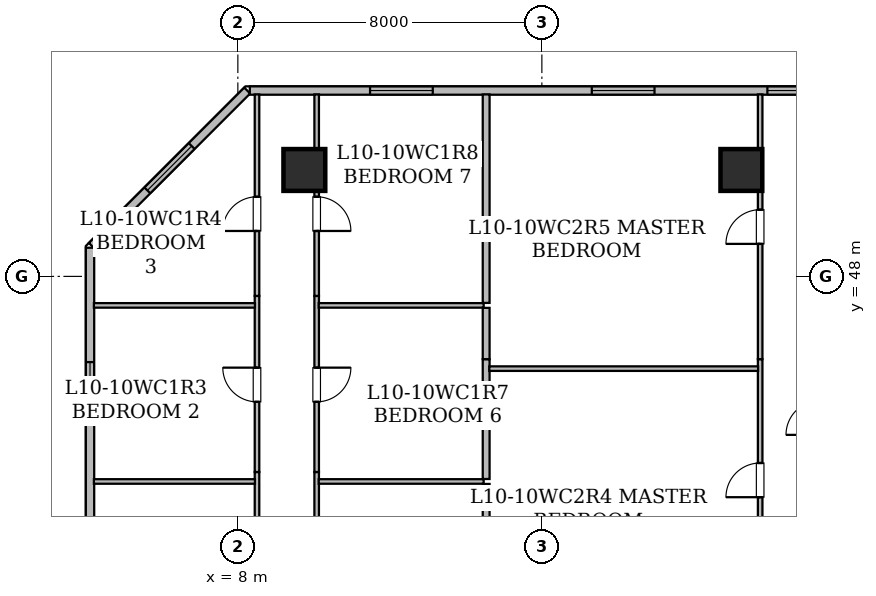
"""IFC4 building model, lengths in metres.
Left out: names, types, materials, properties, quantities, classifications, styles, units other than length and angle.
Written with IfcOpenShell. Run it as: python <this file> out.ifc"""

import sys

from ifc_helpers import new_model, si_unit, direction, frame, frame_2d, origin, origin_2d, place, context, subcontext, project, spatial, rectangle, hollow_rectangle, extrude, element, fill, save


model = new_model("IFC4")
c1 = context("Model", 3, precision=1e-05, world=origin(), true_north=direction((0.0, 1.0)))
c2 = subcontext(c1, "Body", "Model", "MODEL_VIEW")
j1 = project(units=[si_unit("LENGTHUNIT", "METRE"), si_unit("PLANEANGLEUNIT", "RADIAN")], contexts=[c1])
p1 = place(None, origin())
s1 = spatial("IfcSite", under=j1, at=p1, CompositionType="ELEMENT")
p2 = place(p1, origin())
s2 = spatial("IfcBuilding", under=s1, at=p2, CompositionType="ELEMENT")
p3 = place(p2, frame((0.0, 0.0, 44.25)))
s3 = spatial("IfcBuildingStorey", under=s2, at=p3, CompositionType="ELEMENT", Elevation=44.25)
for number, where, z_axis, x_axis in (
    (1, (9.75, 50.8, 0.0), (0.0, 0.0, 1.0), (1.0, 0.0, 0.0)),
    (2, (21.25, 50.8, 0.0), (0.0, 0.0, 1.0), (1.0, 0.0, 0.0)),
):
    element("IfcColumn", number, at=place(p3, frame(where, z_axis=z_axis, x_axis=x_axis)), inside=s3, PredefinedType="COLUMN", context=c2, shape_type="SweptSolid", body=[
        extrude(hollow_rectangle(XDim=1.1, YDim=1.1, WallThickness=0.055, at=origin_2d()), origin(), (0.0, 0.0, 1.0), 3.65),
    ])
p4 = place(p3, frame((4.11, 31.295, 0.0), z_axis=(0.0, 0.0, 1.0), x_axis=(0.0, 1.0, 0.0)))
e3 = element("IfcWall", 3, at=p4, inside=s3, PredefinedType="STANDARD", context=c2, shape_type="SweptSolid", body=[
    extrude(rectangle(XDim=17.459, YDim=0.22, at=frame_2d((8.729, 0.0))), origin(), (0.0, 0.0, 1.0), 3.43),
])
p5 = place(p4, frame((1.376, 0.0, 0.85)))
e4 = element("IfcOpeningElement", 4, at=p5, cuts=e3, PredefinedType="OPENING", context=c2, shape_type="SweptSolid", body=[
    extrude(rectangle(XDim=1.65, YDim=1.55, at=frame_2d((0.825, 0.775))), frame((0.0, 0.12, 0.0), z_axis=(0.0, -1.0, 0.0), x_axis=(1.0, 0.0, 0.0)), (0.0, 0.0, 1.0), 0.24),
])
p6 = place(p4, frame((6.638, 0.0, 0.85)))
e5 = element("IfcOpeningElement", 5, at=p6, cuts=e3, PredefinedType="OPENING", context=c2, shape_type="SweptSolid", body=[
    extrude(rectangle(XDim=1.65, YDim=1.55, at=frame_2d((0.825, 0.775))), frame((0.0, 0.12, 0.0), z_axis=(0.0, -1.0, 0.0), x_axis=(1.0, 0.0, 0.0)), (0.0, 0.0, 1.0), 0.24),
])
p7 = place(p4, frame((12.8, 0.0, 0.85)))
e6 = element("IfcOpeningElement", 6, at=p7, cuts=e3, PredefinedType="OPENING", context=c2, shape_type="SweptSolid", body=[
    extrude(rectangle(XDim=1.65, YDim=1.55, at=frame_2d((0.825, 0.775))), frame((0.0, 0.12, 0.0), z_axis=(0.0, -1.0, 0.0), x_axis=(1.0, 0.0, 0.0)), (0.0, 0.0, 1.0), 0.24),
])
p8 = place(p3, frame((4.158, 48.802, 0.0), z_axis=(0.0, 0.0, 1.0), x_axis=(0.70712789547, 0.707085666273, 0.0)))
e7 = element("IfcWall", 7, at=p8, inside=s3, PredefinedType="STANDARD", context=c2, shape_type="SweptSolid", body=[
    extrude(rectangle(XDim=5.781, YDim=0.22, at=frame_2d((2.891, 0.0))), origin(), (0.0, 0.0, 1.0), 3.43),
])
p9 = place(p8, frame((2.066, 0.0, 0.85)))
e8 = element("IfcOpeningElement", 8, at=p9, cuts=e7, PredefinedType="OPENING", context=c2, shape_type="SweptSolid", body=[
    extrude(rectangle(XDim=1.65, YDim=1.55, at=frame_2d((0.825, 0.775))), frame((0.0, 0.12, 0.0), z_axis=(0.0, -1.0, 0.0), x_axis=(1.0, 0.0, 0.0)), (0.0, 0.0, 1.0), 0.24),
])
p10 = place(p3, frame((8.315, 52.89, 0.0), z_axis=(0.0, 0.0, 1.0), x_axis=(1.0, 0.0, 0.0)))
e9 = element("IfcWall", 9, at=p10, inside=s3, PredefinedType="STANDARD", context=c2, shape_type="SweptSolid", body=[
    extrude(rectangle(XDim=37.439, YDim=0.22, at=frame_2d((18.719, 0.0))), origin(), (0.0, 0.0, 1.0), 3.43),
])
p11 = place(p10, frame((3.164, 0.0, 0.85)))
e10 = element("IfcOpeningElement", 10, at=p11, cuts=e9, PredefinedType="OPENING", context=c2, shape_type="SweptSolid", body=[
    extrude(rectangle(XDim=1.65, YDim=1.55, at=frame_2d((0.825, 0.775))), frame((0.0, 0.12, 0.0), z_axis=(0.0, -1.0, 0.0), x_axis=(1.0, 0.0, 0.0)), (0.0, 0.0, 1.0), 0.24),
])
p12 = place(p10, frame((15.94, 0.0, 0.85)))
e11 = element("IfcOpeningElement", 11, at=p12, cuts=e9, PredefinedType="OPENING", context=c2, shape_type="SweptSolid", body=[
    extrude(rectangle(XDim=1.65, YDim=1.55, at=frame_2d((0.825, 0.775))), frame((0.0, 0.12, 0.0), z_axis=(0.0, -1.0, 0.0), x_axis=(1.0, 0.0, 0.0)), (0.0, 0.0, 1.0), 0.24),
])
p13 = place(p10, frame((13.619, 0.0, 0.8)))
e12 = element("IfcOpeningElement", 12, at=p13, cuts=e9, PredefinedType="OPENING", context=c2, shape_type="SweptSolid", body=[
    extrude(rectangle(XDim=1.2, YDim=1.5, at=frame_2d((0.6, 0.75))), frame((0.0, 0.12, 0.0), z_axis=(0.0, -1.0, 0.0), x_axis=(1.0, 0.0, 0.0)), (0.0, 0.0, 1.0), 0.24),
])
p14 = place(p10, frame((8.999, 0.0, 0.85)))
e13 = element("IfcOpeningElement", 13, at=p14, cuts=e9, PredefinedType="OPENING", context=c2, shape_type="SweptSolid", body=[
    extrude(rectangle(XDim=1.65, YDim=1.55, at=frame_2d((0.825, 0.775))), frame((0.0, 0.12, 0.0), z_axis=(0.0, -1.0, 0.0), x_axis=(1.0, 0.0, 0.0)), (0.0, 0.0, 1.0), 0.24),
])
p15 = place(p10, frame((25.185, 0.0, 0.8)))
e14 = element("IfcOpeningElement", 14, at=p15, cuts=e9, PredefinedType="OPENING", context=c2, shape_type="SweptSolid", body=[
    extrude(rectangle(XDim=1.2, YDim=1.5, at=frame_2d((0.6, 0.75))), frame((0.0, 0.12, 0.0), z_axis=(0.0, -1.0, 0.0), x_axis=(1.0, 0.0, 0.0)), (0.0, 0.0, 1.0), 0.24),
])
p16 = place(p10, frame((20.935, 0.0, 0.85)))
e15 = element("IfcOpeningElement", 15, at=p16, cuts=e9, PredefinedType="OPENING", context=c2, shape_type="SweptSolid", body=[
    extrude(rectangle(XDim=1.65, YDim=1.55, at=frame_2d((0.825, 0.775))), frame((0.0, 0.12, 0.0), z_axis=(0.0, -1.0, 0.0), x_axis=(1.0, 0.0, 0.0)), (0.0, 0.0, 1.0), 0.24),
])
p17 = place(p10, frame((28.985, 0.0, 0.85)))
e16 = element("IfcOpeningElement", 16, at=p17, cuts=e9, PredefinedType="OPENING", context=c2, shape_type="SweptSolid", body=[
    extrude(rectangle(XDim=1.65, YDim=1.55, at=frame_2d((0.825, 0.775))), frame((0.0, 0.12, 0.0), z_axis=(0.0, -1.0, 0.0), x_axis=(1.0, 0.0, 0.0)), (0.0, 0.0, 1.0), 0.24),
])
p18 = place(p10, frame((33.98, 0.0, 0.85)))
e17 = element("IfcOpeningElement", 17, at=p18, cuts=e9, PredefinedType="OPENING", context=c2, shape_type="SweptSolid", body=[
    extrude(rectangle(XDim=1.65, YDim=1.55, at=frame_2d((0.825, 0.775))), frame((0.0, 0.12, 0.0), z_axis=(0.0, -1.0, 0.0), x_axis=(1.0, 0.0, 0.0)), (0.0, 0.0, 1.0), 0.24),
])
p19 = place(p3, frame((8.504, 35.161, 0.0), z_axis=(0.0, 0.0, 1.0), x_axis=(0.0, 1.0, 0.0)))
e18 = element("IfcWall", 18, at=p19, inside=s3, PredefinedType="PARTITIONING", context=c2, shape_type="SweptSolid", body=[
    extrude(rectangle(XDim=7.692, YDim=0.12, at=frame_2d((3.846, 0.0))), origin(), (0.0, 0.0, 1.0), 2.647),
])
p20 = place(p19, frame((3.375, 0.0, 0.0)))
e19 = element("IfcOpeningElement", 19, at=p20, cuts=e18, PredefinedType="OPENING", context=c2, shape_type="SweptSolid", body=[
    extrude(rectangle(XDim=0.9, YDim=2.1, at=frame_2d((0.45, 1.05))), frame((0.0, 0.07, 0.0), z_axis=(0.0, -1.0, 0.0), x_axis=(1.0, 0.0, 0.0)), (0.0, 0.0, 1.0), 0.14),
])
p21 = place(p3, frame((8.504, 42.853, 0.0), z_axis=(0.0, 0.0, 1.0), x_axis=(0.0, 1.0, 0.0)))
e20 = element("IfcWall", 20, at=p21, inside=s3, PredefinedType="PARTITIONING", context=c2, shape_type="SweptSolid", body=[
    extrude(rectangle(XDim=4.633, YDim=0.12, at=frame_2d((2.316, 0.0))), origin(), (0.0, 0.0, 1.0), 2.803),
])
p22 = place(p21, frame((1.846, 0.0, 0.0)))
e21 = element("IfcOpeningElement", 21, at=p22, cuts=e20, PredefinedType="OPENING", context=c2, shape_type="SweptSolid", body=[
    extrude(rectangle(XDim=0.9, YDim=2.1, at=frame_2d((0.45, 1.05))), frame((0.0, 0.07, 0.0), z_axis=(0.0, -1.0, 0.0), x_axis=(1.0, 0.0, 0.0)), (0.0, 0.0, 1.0), 0.14),
])
p23 = place(p3, frame((8.504, 47.486, 0.0), z_axis=(0.0, 0.0, 1.0), x_axis=(0.0, 1.0, 0.0)))
e22 = element("IfcWall", 22, at=p23, inside=s3, PredefinedType="PARTITIONING", context=c2, shape_type="SweptSolid", body=[
    extrude(rectangle(XDim=5.302, YDim=0.12, at=frame_2d((2.651, 0.0))), origin(), (0.0, 0.0, 1.0), 2.803),
])
p24 = place(p23, frame((1.709, 0.0, 0.0)))
e23 = element("IfcOpeningElement", 23, at=p24, cuts=e22, PredefinedType="OPENING", context=c2, shape_type="SweptSolid", body=[
    extrude(rectangle(XDim=0.9, YDim=2.1, at=frame_2d((0.45, 1.05))), frame((0.0, 0.07, 0.0), z_axis=(0.0, -1.0, 0.0), x_axis=(1.0, 0.0, 0.0)), (0.0, 0.0, 1.0), 0.14),
])
p25 = place(p3, frame((10.074, 42.853, 0.0), z_axis=(0.0, 0.0, 1.0), x_axis=(0.0, -1.0, 0.0)))
e24 = element("IfcWall", 24, at=p25, inside=s3, PredefinedType="PARTITIONING", context=c2, shape_type="SweptSolid", body=[
    extrude(rectangle(XDim=7.692, YDim=0.12, at=frame_2d((3.846, 0.0))), origin(), (0.0, 0.0, 1.0), 2.647),
])
p26 = place(p25, frame((3.417, 0.0, 0.0)))
e25 = element("IfcOpeningElement", 25, at=p26, cuts=e24, PredefinedType="OPENING", context=c2, shape_type="SweptSolid", body=[
    extrude(rectangle(XDim=0.9, YDim=2.1, at=frame_2d((0.45, 1.05))), frame((0.0, 0.07, 0.0), z_axis=(0.0, -1.0, 0.0), x_axis=(1.0, 0.0, 0.0)), (0.0, 0.0, 1.0), 0.14),
])
p27 = place(p3, frame((10.074, 47.486, 0.0), z_axis=(0.0, 0.0, 1.0), x_axis=(0.0, -1.0, 0.0)))
e26 = element("IfcWall", 26, at=p27, inside=s3, PredefinedType="PARTITIONING", context=c2, shape_type="SweptSolid", body=[
    extrude(rectangle(XDim=4.633, YDim=0.12, at=frame_2d((2.316, 0.0))), origin(), (0.0, 0.0, 1.0), 3.43),
])
p28 = place(p27, frame((1.887, 0.0, 0.0)))
e27 = element("IfcOpeningElement", 27, at=p28, cuts=e26, PredefinedType="OPENING", context=c2, shape_type="SweptSolid", body=[
    extrude(rectangle(XDim=0.9, YDim=2.1, at=frame_2d((0.45, 1.05))), frame((0.0, 0.07, 0.0), z_axis=(0.0, -1.0, 0.0), x_axis=(1.0, 0.0, 0.0)), (0.0, 0.0, 1.0), 0.14),
])
p29 = place(p3, frame((10.074, 52.788, 0.0), z_axis=(0.0, 0.0, 1.0), x_axis=(0.0, -1.0, 0.0)))
e28 = element("IfcWall", 28, at=p29, inside=s3, PredefinedType="PARTITIONING", context=c2, shape_type="SweptSolid", body=[
    extrude(rectangle(XDim=5.302, YDim=0.12, at=frame_2d((2.651, 0.0))), origin(), (0.0, 0.0, 1.0), 2.647),
])
p30 = place(p29, frame((2.693, 0.0, 0.0)))
e29 = element("IfcOpeningElement", 29, at=p30, cuts=e28, PredefinedType="OPENING", context=c2, shape_type="SweptSolid", body=[
    extrude(rectangle(XDim=0.9, YDim=2.1, at=frame_2d((0.45, 1.05))), frame((0.0, 0.07, 0.0), z_axis=(0.0, -1.0, 0.0), x_axis=(1.0, 0.0, 0.0)), (0.0, 0.0, 1.0), 0.14),
])
for number, where, z_axis, x_axis in (
    (30, (4.212, 42.604, 0.0), (0.0, 0.0, 1.0), (1.0, 0.0, 0.0)),
    (31, (4.212, 47.237, 0.0), (0.0, 0.0, 1.0), (1.0, 0.0, 0.0)),
):
    element("IfcWall", number, at=place(p3, frame(where, z_axis=z_axis, x_axis=x_axis)), inside=s3, PredefinedType="PARTITIONING", context=c2, shape_type="SweptSolid", body=[
        extrude(rectangle(XDim=4.238, YDim=0.12, at=frame_2d((2.119, 0.0))), origin(), (0.0, 0.0, 1.0), 2.803),
    ])
p31 = place(p3, frame((10.128, 42.604, 0.0), z_axis=(0.0, 0.0, 1.0), x_axis=(1.0, 0.0, 0.0)))
e32 = element("IfcWall", 32, at=p31, inside=s3, PredefinedType="PARTITIONING", context=c2, shape_type="SweptSolid", body=[
    extrude(rectangle(XDim=4.341, YDim=0.12, at=frame_2d((2.17, 0.0))), origin(), (0.0, 0.0, 1.0), 2.957),
])
p32 = place(p3, frame((14.534, 42.539, 0.0), z_axis=(0.0, 0.0, 1.0), x_axis=(0.0, -1.0, 0.0)))
e33 = element("IfcWall", 33, at=p32, inside=s3, PredefinedType="STANDARD", context=c2, shape_type="SweptSolid", body=[
    extrude(rectangle(XDim=3.038, YDim=0.18, at=frame_2d((1.519, 0.0))), origin(), (0.0, 0.0, 1.0), 2.957),
])
p33 = place(p3, frame((10.128, 47.237, 0.0), z_axis=(0.0, 0.0, 1.0), x_axis=(1.0, 0.0, 0.0)))
e34 = element("IfcWall", 34, at=p33, inside=s3, PredefinedType="PARTITIONING", context=c2, shape_type="SweptSolid", body=[
    extrude(rectangle(XDim=4.341, YDim=0.12, at=frame_2d((2.17, 0.0))), origin(), (0.0, 0.0, 1.0), 2.647),
])
p34 = place(p3, frame((14.534, 45.822, 0.0), z_axis=(0.0, 0.0, 1.0), x_axis=(0.0, -1.0, 0.0)))
e35 = element("IfcWall", 35, at=p34, inside=s3, PredefinedType="STANDARD", context=c2, shape_type="SweptSolid", body=[
    extrude(rectangle(XDim=3.153, YDim=0.18, at=frame_2d((1.577, 0.0))), origin(), (0.0, 0.0, 1.0), 2.647),
])
p35 = place(p3, frame((14.534, 47.172, 0.0), z_axis=(0.0, 0.0, 1.0), x_axis=(0.0, -1.0, 0.0)))
e36 = element("IfcWall", 36, at=p35, inside=s3, PredefinedType="STANDARD", context=c2, shape_type="SweptSolid", body=[
    extrude(rectangle(XDim=1.35, YDim=0.18, at=frame_2d((0.675, 0.0))), origin(), (0.0, 0.0, 1.0), 3.43),
])
p36 = place(p3, frame((14.534, 52.788, 0.0), z_axis=(0.0, 0.0, 1.0), x_axis=(0.0, -1.0, 0.0)))
e37 = element("IfcWall", 37, at=p36, inside=s3, PredefinedType="STANDARD", context=c2, shape_type="SweptSolid", body=[
    extrude(rectangle(XDim=5.486, YDim=0.18, at=frame_2d((2.743, 0.0))), origin(), (0.0, 0.0, 1.0), 2.803),
])
p37 = place(p3, frame((21.744, 39.501, 0.0), z_axis=(0.0, 0.0, 1.0), x_axis=(0.0, 1.0, 0.0)))
e38 = element("IfcWall", 38, at=p37, inside=s3, PredefinedType="PARTITIONING", context=c2, shape_type="SweptSolid", body=[
    extrude(rectangle(XDim=6.321, YDim=0.12, at=frame_2d((3.161, 0.0))), origin(), (0.0, 0.0, 1.0), 2.957),
])
p38 = place(p37, frame((2.689, 0.0, 0.0)))
e39 = element("IfcOpeningElement", 39, at=p38, cuts=e38, PredefinedType="OPENING", context=c2, shape_type="SweptSolid", body=[
    extrude(rectangle(XDim=0.9, YDim=2.1, at=frame_2d((0.45, 1.05))), frame((0.0, 0.07, 0.0), z_axis=(0.0, -1.0, 0.0), x_axis=(1.0, 0.0, 0.0)), (0.0, 0.0, 1.0), 0.14),
])
p39 = place(p3, frame((21.744, 45.822, 0.0), z_axis=(0.0, 0.0, 1.0), x_axis=(0.0, 1.0, 0.0)))
e40 = element("IfcWall", 40, at=p39, inside=s3, PredefinedType="PARTITIONING", context=c2, shape_type="SweptSolid", body=[
    extrude(rectangle(XDim=6.966, YDim=0.12, at=frame_2d((3.483, 0.0))), origin(), (0.0, 0.0, 1.0), 2.803),
])
p40 = place(p39, frame((3.033, 0.0, 0.0)))
e41 = element("IfcOpeningElement", 41, at=p40, cuts=e40, PredefinedType="OPENING", context=c2, shape_type="SweptSolid", body=[
    extrude(rectangle(XDim=0.9, YDim=2.1, at=frame_2d((0.45, 1.05))), frame((0.0, 0.07, 0.0), z_axis=(0.0, -1.0, 0.0), x_axis=(1.0, 0.0, 0.0)), (0.0, 0.0, 1.0), 0.14),
])
p41 = place(p3, frame((14.616, 45.573, 0.0), z_axis=(0.0, 0.0, 1.0), x_axis=(1.0, 0.0, 0.0)))
e42 = element("IfcWall", 42, at=p41, inside=s3, PredefinedType="PARTITIONING", context=c2, shape_type="SweptSolid", body=[
    extrude(rectangle(XDim=7.074, YDim=0.12, at=frame_2d((3.537, 0.0))), origin(), (0.0, 0.0, 1.0), 2.647),
])
p42 = place(p7, origin())
e43 = element("IfcWindow", 43, at=p42, inside=s3, PartitioningType="SINGLE_PANEL", PredefinedType="WINDOW", context=c2, shape_type="SweptSolid", body=[
    extrude(rectangle(XDim=1.65, YDim=1.55, at=frame_2d((0.825, 0.775))), frame((0.0, 0.03, 0.0), z_axis=(0.0, -1.0, 0.0), x_axis=(1.0, 0.0, 0.0)), (0.0, 0.0, 1.0), 0.06),
])
fill(e6, e43)
p43 = place(p9, origin())
e44 = element("IfcWindow", 44, at=p43, inside=s3, PartitioningType="SINGLE_PANEL", PredefinedType="WINDOW", context=c2, shape_type="SweptSolid", body=[
    extrude(rectangle(XDim=1.65, YDim=1.55, at=frame_2d((0.825, 0.775))), frame((0.0, 0.03, 0.0), z_axis=(0.0, -1.0, 0.0), x_axis=(1.0, 0.0, 0.0)), (0.0, 0.0, 1.0), 0.06),
])
fill(e8, e44)
p44 = place(p11, origin())
e45 = element("IfcWindow", 45, at=p44, inside=s3, PartitioningType="SINGLE_PANEL", PredefinedType="WINDOW", context=c2, shape_type="SweptSolid", body=[
    extrude(rectangle(XDim=1.65, YDim=1.55, at=frame_2d((0.825, 0.775))), frame((0.0, 0.03, 0.0), z_axis=(0.0, -1.0, 0.0), x_axis=(1.0, 0.0, 0.0)), (0.0, 0.0, 1.0), 0.06),
])
fill(e10, e45)
p45 = place(p13, origin())
e46 = element("IfcWindow", 46, at=p45, inside=s3, PartitioningType="SINGLE_PANEL", PredefinedType="WINDOW", context=c2, shape_type="SweptSolid", body=[
    extrude(rectangle(XDim=1.2, YDim=1.5, at=frame_2d((0.6, 0.75))), frame((0.0, 0.03, 0.0), z_axis=(0.0, -1.0, 0.0), x_axis=(1.0, 0.0, 0.0)), (0.0, 0.0, 1.0), 0.06),
])
fill(e12, e46)
p46 = place(p14, origin())
e47 = element("IfcWindow", 47, at=p46, inside=s3, PartitioningType="SINGLE_PANEL", PredefinedType="WINDOW", context=c2, shape_type="SweptSolid", body=[
    extrude(rectangle(XDim=1.65, YDim=1.55, at=frame_2d((0.825, 0.775))), frame((0.0, 0.03, 0.0), z_axis=(0.0, -1.0, 0.0), x_axis=(1.0, 0.0, 0.0)), (0.0, 0.0, 1.0), 0.06),
])
fill(e13, e47)
p47 = place(p22, origin())
e48 = element("IfcDoor", 48, at=p47, inside=s3, OperationType="SINGLE_SWING_RIGHT", PredefinedType="DOOR", context=c2, shape_type="SweptSolid", body=[
    extrude(rectangle(XDim=0.9, YDim=2.1, at=frame_2d((0.45, 1.05))), frame((0.0, 0.025, 0.0), z_axis=(0.0, -1.0, 0.0), x_axis=(1.0, 0.0, 0.0)), (0.0, 0.0, 1.0), 0.05),
])
fill(e21, e48)
p48 = place(p24, origin())
e49 = element("IfcDoor", 49, at=p48, inside=s3, OperationType="SINGLE_SWING_LEFT", PredefinedType="DOOR", context=c2, shape_type="SweptSolid", body=[
    extrude(rectangle(XDim=0.9, YDim=2.1, at=frame_2d((0.45, 1.05))), frame((0.0, 0.025, 0.0), z_axis=(0.0, -1.0, 0.0), x_axis=(1.0, 0.0, 0.0)), (0.0, 0.0, 1.0), 0.05),
])
fill(e23, e49)
p49 = place(p28, origin())
e50 = element("IfcDoor", 50, at=p49, inside=s3, OperationType="SINGLE_SWING_LEFT", PredefinedType="DOOR", context=c2, shape_type="SweptSolid", body=[
    extrude(rectangle(XDim=0.9, YDim=2.1, at=frame_2d((0.45, 1.05))), frame((0.0, 0.025, 0.0), z_axis=(0.0, -1.0, 0.0), x_axis=(1.0, 0.0, 0.0)), (0.0, 0.0, 1.0), 0.05),
])
fill(e27, e50)
p50 = place(p30, origin())
e51 = element("IfcDoor", 51, at=p50, inside=s3, OperationType="SINGLE_SWING_RIGHT", PredefinedType="DOOR", context=c2, shape_type="SweptSolid", body=[
    extrude(rectangle(XDim=0.9, YDim=2.1, at=frame_2d((0.45, 1.05))), frame((0.0, 0.025, 0.0), z_axis=(0.0, -1.0, 0.0), x_axis=(1.0, 0.0, 0.0)), (0.0, 0.0, 1.0), 0.05),
])
fill(e29, e51)
p51 = place(p38, origin())
e52 = element("IfcDoor", 52, at=p51, inside=s3, OperationType="SINGLE_SWING_LEFT", PredefinedType="DOOR", context=c2, shape_type="SweptSolid", body=[
    extrude(rectangle(XDim=0.9, YDim=2.1, at=frame_2d((0.45, 1.05))), frame((0.0, 0.025, 0.0), z_axis=(0.0, -1.0, 0.0), x_axis=(1.0, 0.0, 0.0)), (0.0, 0.0, 1.0), 0.05),
])
fill(e39, e52)
p52 = place(p40, origin())
e53 = element("IfcDoor", 53, at=p52, inside=s3, OperationType="SINGLE_SWING_LEFT", PredefinedType="DOOR", context=c2, shape_type="SweptSolid", body=[
    extrude(rectangle(XDim=0.9, YDim=2.1, at=frame_2d((0.45, 1.05))), frame((0.0, 0.025, 0.0), z_axis=(0.0, -1.0, 0.0), x_axis=(1.0, 0.0, 0.0)), (0.0, 0.0, 1.0), 0.05),
])
fill(e41, e53)
save(model, sys.argv[1])
